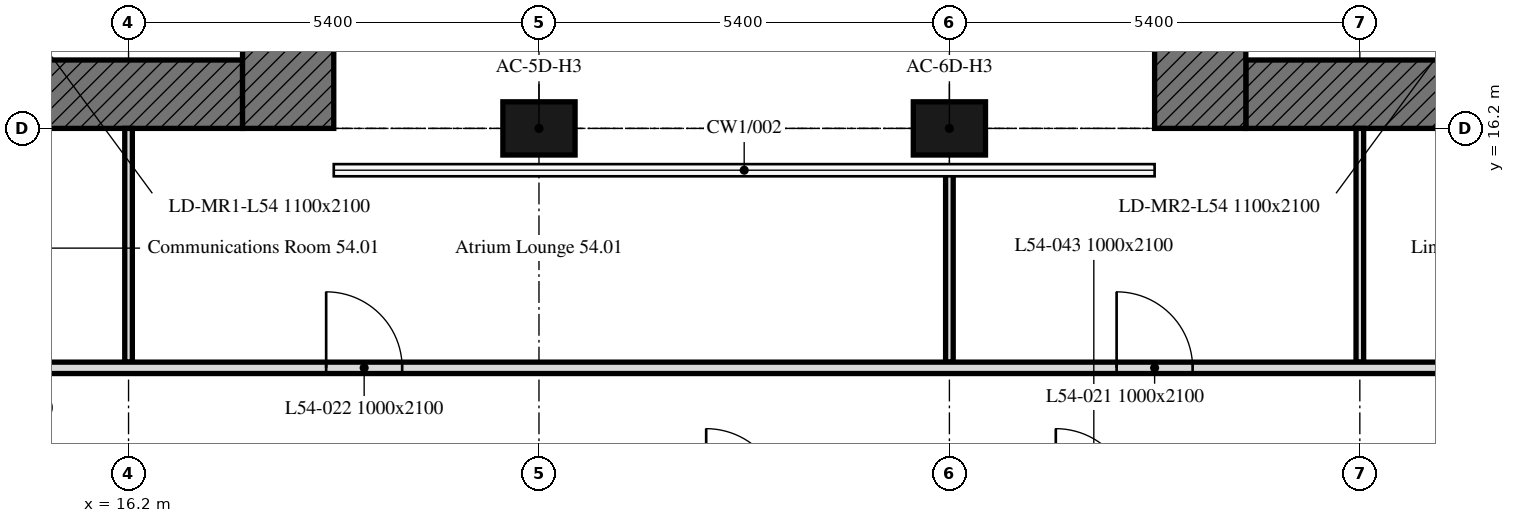
"""IFC4 building model, lengths in metres.
Left out: names, types, materials, properties, quantities, classifications, styles, units other than length and angle.
Written with IfcOpenShell. Run it as: python <this file> out.ifc"""

import sys

from ifc_helpers import new_model, si_unit, direction, frame, frame_2d, origin, origin_2d, place, context, subcontext, project, spatial, rectangle, extrude, element, fill, save


model = new_model("IFC4")
c1 = context("Model", 3, precision=1e-05, world=origin(), true_north=direction((0.0, 1.0)))
c2 = subcontext(c1, "Body", "Model", "MODEL_VIEW")
j1 = project(units=[si_unit("LENGTHUNIT", "METRE"), si_unit("PLANEANGLEUNIT", "RADIAN")], contexts=[c1])
p1 = place(None, origin())
s1 = spatial("IfcSite", under=j1, at=p1, CompositionType="ELEMENT")
p2 = place(p1, origin())
s2 = spatial("IfcBuilding", under=s1, at=p2, CompositionType="ELEMENT")
p3 = place(p2, frame((0.0, 0.0, 217.0)))
s3 = spatial("IfcBuildingStorey", under=s2, at=p3, CompositionType="ELEMENT", Elevation=217.0)
for number, where, z_axis, x_axis in (
    (1, (21.6, 16.2, 0.0), (0.0, 0.0, 1.0), (1.0, 0.0, 0.0)),
    (2, (27.0, 16.2, 0.0), (0.0, 0.0, 1.0), (1.0, 0.0, 0.0)),
):
    element("IfcColumn", number, at=place(p3, frame(where, z_axis=z_axis, x_axis=x_axis)), inside=s3, PredefinedType="COLUMN", context=c2, shape_type="SweptSolid", body=[
        extrude(rectangle(XDim=0.95, YDim=0.7, at=origin_2d()), origin(), (0.0, 0.0, 1.0), 3.0),
    ])
p4 = place(p3, frame((17.7, 16.65, 0.0), z_axis=(0.0, 0.0, 1.0), x_axis=(-1.0, 0.0, 0.0)))
e3 = element("IfcWall", 3, at=p4, inside=s3, PredefinedType="SOLIDWALL", context=c2, shape_type="SweptSolid", body=[
    extrude(rectangle(XDim=11.1, YDim=0.9, at=frame_2d((5.55, 0.0))), origin(), (0.0, 0.0, 1.0), 3.0),
])
p5 = place(p4, frame((5.55, 0.0, 0.0)))
e4 = element("IfcOpeningElement", 4, at=p5, cuts=e3, PredefinedType="OPENING", context=c2, shape_type="SweptSolid", body=[
    extrude(rectangle(XDim=2.0, YDim=2.4, at=frame_2d((1.0, 1.2))), frame((0.0, 0.45, 0.0), z_axis=(0.0, -1.0, 0.0), x_axis=(1.0, 0.0, 0.0)), (0.0, 0.0, 1.0), 0.9),
])
p6 = place(p3, frame((18.3, 32.4, 0.0), z_axis=(0.0, 0.0, 1.0), x_axis=(0.0, -1.0, 0.0)))
e5 = element("IfcWall", 5, at=p6, inside=s3, PredefinedType="SOLIDWALL", context=c2, shape_type="SweptSolid", body=[
    extrude(rectangle(XDim=16.2, YDim=1.2, at=frame_2d((8.1, 0.0))), origin(), (0.0, 0.0, 1.0), 3.0),
])
p7 = place(p3, frame((42.0, 16.65, 0.0), z_axis=(0.0, 0.0, 1.0), x_axis=(-1.0, 0.0, 0.0)))
e6 = element("IfcWall", 6, at=p7, inside=s3, PredefinedType="SOLIDWALL", context=c2, shape_type="SweptSolid", body=[
    extrude(rectangle(XDim=11.1, YDim=0.9, at=frame_2d((5.55, 0.0))), origin(), (0.0, 0.0, 1.0), 3.0),
])
p8 = place(p7, frame((3.55, 0.0, 0.0)))
e7 = element("IfcOpeningElement", 7, at=p8, cuts=e6, PredefinedType="OPENING", context=c2, shape_type="SweptSolid", body=[
    extrude(rectangle(XDim=2.0, YDim=2.4, at=frame_2d((1.0, 1.2))), frame((0.0, 0.45, 0.0), z_axis=(0.0, -1.0, 0.0), x_axis=(1.0, 0.0, 0.0)), (0.0, 0.0, 1.0), 0.9),
])
p9 = place(p3, frame((30.3, 16.2, 0.0), z_axis=(0.0, 0.0, 1.0), x_axis=(0.0, 1.0, 0.0)))
e8 = element("IfcWall", 8, at=p9, inside=s3, PredefinedType="SOLIDWALL", context=c2, shape_type="SweptSolid", body=[
    extrude(rectangle(XDim=16.2, YDim=1.2, at=frame_2d((8.1, 0.0))), origin(), (0.0, 0.0, 1.0), 3.0),
])
p10 = place(p3, frame((32.4, 13.125, 0.0), z_axis=(0.0, 0.0, 1.0), x_axis=(0.0, 1.0, 0.0)))
e9 = element("IfcWall", 9, at=p10, inside=s3, PredefinedType="PARTITIONING", context=c2, shape_type="SweptSolid", body=[
    extrude(rectangle(XDim=3.075, YDim=0.1, at=frame_2d((1.538, 0.0))), origin(), (0.0, 0.0, 1.0), 3.0),
])
p11 = place(p3, frame((27.0, 15.705, 0.0), z_axis=(0.0, 0.0, 1.0), x_axis=(0.0, -1.0, 0.0)))
e10 = element("IfcWall", 10, at=p11, inside=s3, PredefinedType="PARTITIONING", context=c2, shape_type="SweptSolid", body=[
    extrude(rectangle(XDim=2.58, YDim=0.1, at=frame_2d((1.29, 0.0))), origin(), (0.0, 0.0, 1.0), 3.0),
])
p12 = place(p3, frame((16.2, 16.2, 0.0), z_axis=(0.0, 0.0, 1.0), x_axis=(0.0, -1.0, 0.0)))
e11 = element("IfcWall", 11, at=p12, inside=s3, PredefinedType="PARTITIONING", context=c2, shape_type="SweptSolid", body=[
    extrude(rectangle(XDim=3.075, YDim=0.1, at=frame_2d((1.538, 0.0))), origin(), (0.0, 0.0, 1.0), 3.0),
])
p13 = place(p3, frame((5.325, 13.05, 0.0), z_axis=(0.0, 0.0, 1.0), x_axis=(1.0, 0.0, 0.0)))
e12 = element("IfcWall", 12, at=p13, inside=s3, PredefinedType="PARTITIONING", context=c2, shape_type="SweptSolid", body=[
    extrude(rectangle(XDim=37.124, YDim=0.15, at=frame_2d((18.562, 0.0))), origin(), (0.0, 0.0, 1.0), 3.0),
])
p14 = place(p13, frame((23.875, 0.0, 0.0)))
e13 = element("IfcOpeningElement", 13, at=p14, cuts=e12, PredefinedType="OPENING", context=c2, shape_type="SweptSolid", body=[
    extrude(rectangle(XDim=1.0, YDim=2.1, at=frame_2d((0.5, 1.05))), frame((0.0, 0.075, 0.0), z_axis=(0.0, -1.0, 0.0), x_axis=(1.0, 0.0, 0.0)), (0.0, 0.0, 1.0), 0.15),
])
p15 = place(p13, frame((13.475, 0.0, 0.0)))
e14 = element("IfcOpeningElement", 14, at=p15, cuts=e12, PredefinedType="OPENING", context=c2, shape_type="SweptSolid", body=[
    extrude(rectangle(XDim=1.0, YDim=2.1, at=frame_2d((0.5, 1.05))), frame((0.0, 0.075, 0.0), z_axis=(0.0, -1.0, 0.0), x_axis=(1.0, 0.0, 0.0)), (0.0, 0.0, 1.0), 0.15),
])
p16 = place(p13, frame((34.095, 0.0, 0.0)))
e15 = element("IfcOpeningElement", 15, at=p16, cuts=e12, PredefinedType="OPENING", context=c2, shape_type="SweptSolid", body=[
    extrude(rectangle(XDim=1.0, YDim=2.1, at=frame_2d((0.5, 1.05))), frame((0.0, 0.075, 0.0), z_axis=(0.0, -1.0, 0.0), x_axis=(1.0, 0.0, 0.0)), (0.0, 0.0, 1.0), 0.15),
])
p17 = place(p13, frame((8.337, 0.0, 0.0)))
e16 = element("IfcOpeningElement", 16, at=p17, cuts=e12, PredefinedType="OPENING", context=c2, shape_type="SweptSolid", body=[
    extrude(rectangle(XDim=1.0, YDim=2.1, at=frame_2d((0.5, 1.05))), frame((0.0, 0.075, 0.0), z_axis=(0.0, -1.0, 0.0), x_axis=(1.0, 0.0, 0.0)), (0.0, 0.0, 1.0), 0.15),
])
p18 = place(p13, frame((1.648, 0.0, 0.0)))
e17 = element("IfcOpeningElement", 17, at=p18, cuts=e12, PredefinedType="OPENING", context=c2, shape_type="SweptSolid", body=[
    extrude(rectangle(XDim=1.0, YDim=2.1, at=frame_2d((0.5, 1.05))), frame((0.0, 0.075, 0.0), z_axis=(0.0, -1.0, 0.0), x_axis=(1.0, 0.0, 0.0)), (0.0, 0.0, 1.0), 0.15),
])
p19 = place(p13, frame((28.613, 0.0, 0.0)))
e18 = element("IfcOpeningElement", 18, at=p19, cuts=e12, PredefinedType="OPENING", context=c2, shape_type="SweptSolid", body=[
    extrude(rectangle(XDim=1.0, YDim=2.1, at=frame_2d((0.5, 1.05))), frame((0.0, 0.075, 0.0), z_axis=(0.0, -1.0, 0.0), x_axis=(1.0, 0.0, 0.0)), (0.0, 0.0, 1.0), 0.15),
])
p20 = place(p13, frame((30.625, 0.0, 0.0)))
e19 = element("IfcOpeningElement", 19, at=p20, cuts=e12, PredefinedType="OPENING", context=c2, shape_type="SweptSolid", body=[
    extrude(rectangle(XDim=1.8, YDim=2.4, at=frame_2d((0.9, 1.2))), frame((0.0, 0.075, 0.0), z_axis=(0.0, -1.0, 0.0), x_axis=(1.0, 0.0, 0.0)), (0.0, 0.0, 1.0), 0.15),
])
p21 = place(p13, frame((5.525, 0.0, 0.0)))
e20 = element("IfcOpeningElement", 20, at=p21, cuts=e12, PredefinedType="OPENING", context=c2, shape_type="SweptSolid", body=[
    extrude(rectangle(XDim=1.8, YDim=2.4, at=frame_2d((0.9, 1.2))), frame((0.0, 0.075, 0.0), z_axis=(0.0, -1.0, 0.0), x_axis=(1.0, 0.0, 0.0)), (0.0, 0.0, 1.0), 0.15),
])
p22 = place(p14, origin())
e21 = element("IfcDoor", 21, at=p22, inside=s3, OperationType="SINGLE_SWING_LEFT", PredefinedType="DOOR", context=c2, shape_type="SweptSolid", body=[
    extrude(rectangle(XDim=1.0, YDim=2.1, at=frame_2d((0.5, 1.05))), frame((0.0, 0.025, 0.0), z_axis=(0.0, -1.0, 0.0), x_axis=(1.0, 0.0, 0.0)), (0.0, 0.0, 1.0), 0.05),
])
fill(e13, e21)
p23 = place(p15, origin())
e22 = element("IfcDoor", 22, at=p23, inside=s3, OperationType="SINGLE_SWING_LEFT", PredefinedType="DOOR", context=c2, shape_type="SweptSolid", body=[
    extrude(rectangle(XDim=1.0, YDim=2.1, at=frame_2d((0.5, 1.05))), frame((0.0, 0.025, 0.0), z_axis=(0.0, -1.0, 0.0), x_axis=(1.0, 0.0, 0.0)), (0.0, 0.0, 1.0), 0.05),
])
fill(e14, e22)
save(model, sys.argv[1])
